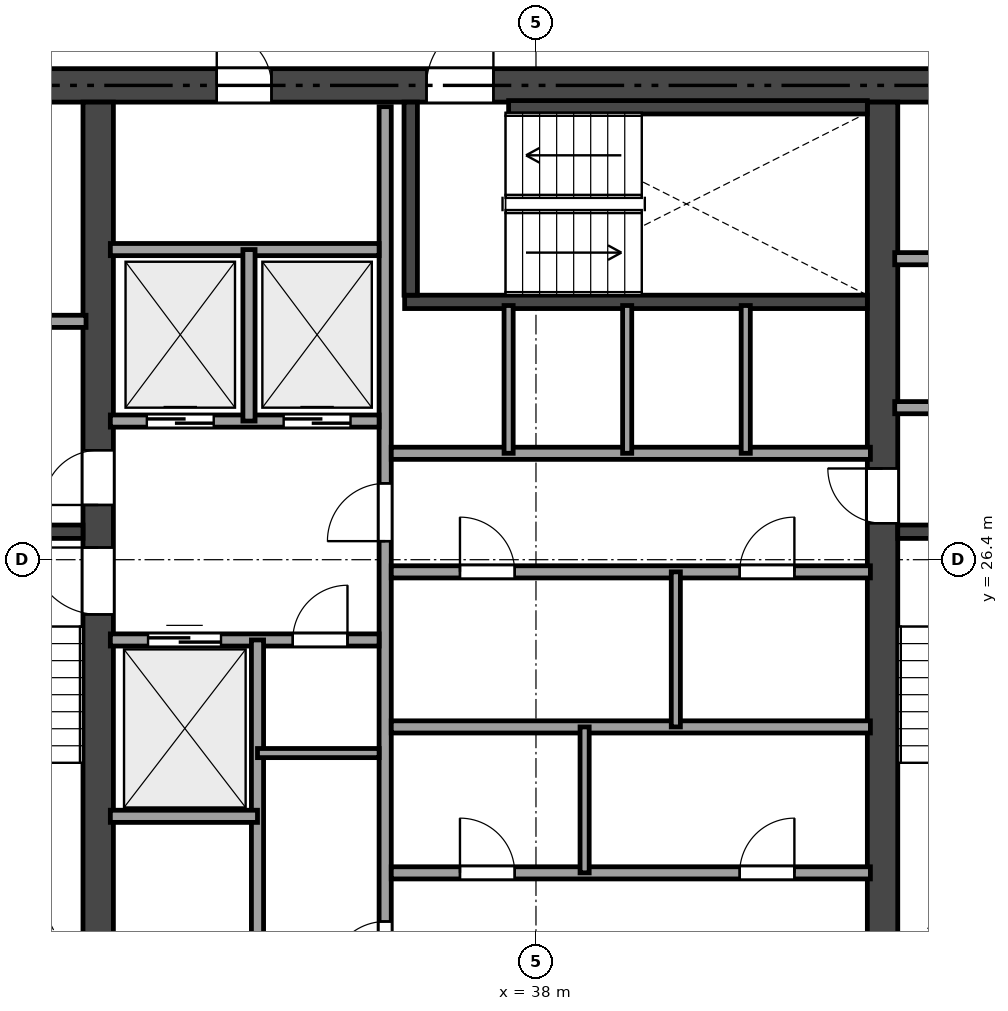
"""IFC4 building model, lengths in metres.
Left out: names, types, materials, properties, quantities, classifications, styles, units other than length and angle.
Written with IfcOpenShell. Run it as: python <this file> out.ifc"""

import sys

from ifc_helpers import new_model, si_unit, direction, frame, frame_2d, origin, place, context, subcontext, project, spatial, rectangle, extrude, element, fill, save


model = new_model("IFC4")
c1 = context("Model", 3, precision=1e-05, world=origin(), true_north=direction((0.0, 1.0)))
c2 = subcontext(c1, "Body", "Model", "MODEL_VIEW")
j1 = project(units=[si_unit("LENGTHUNIT", "METRE"), si_unit("PLANEANGLEUNIT", "RADIAN")], contexts=[c1])
p1 = place(None, origin())
s1 = spatial("IfcSite", under=j1, at=p1, CompositionType="ELEMENT")
p2 = place(p1, origin())
s2 = spatial("IfcBuilding", under=s1, at=p2, CompositionType="ELEMENT")
p3 = place(p2, frame((0.0, 0.0, 283.5)))
s3 = spatial("IfcBuildingStorey", under=s2, at=p3, CompositionType="ELEMENT", Elevation=283.5)
p4 = place(p3, frame((26.525, 34.2, 0.0), z_axis=(0.0, 0.0, 1.0), x_axis=(1.0, 0.0, 0.0)))
e1 = element("IfcWall", 1, at=p4, inside=s3, PredefinedType="SHEAR", context=c2, shape_type="SweptSolid", body=[
    extrude(rectangle(XDim=21.35, YDim=0.55, at=frame_2d((10.675, 0.0))), origin(), (0.0, 0.0, 1.0), 2.84),
])
p5 = place(p4, frame((9.675, 0.0, 0.0)))
e2 = element("IfcOpeningElement", 2, at=p5, cuts=e1, PredefinedType="OPENING", context=c2, shape_type="SweptSolid", body=[
    extrude(rectangle(XDim=1.1, YDim=2.15, at=frame_2d((0.55, 1.075))), frame((0.0, 0.285, 0.0), z_axis=(0.0, -1.0, 0.0), x_axis=(1.0, 0.0, 0.0)), (0.0, 0.0, 1.0), 0.57),
])
p6 = place(p4, frame((1.925, 0.0, 0.0)))
e3 = element("IfcOpeningElement", 3, at=p6, cuts=e1, PredefinedType="OPENING", context=c2, shape_type="SweptSolid", body=[
    extrude(rectangle(XDim=0.9, YDim=2.1, at=frame_2d((0.45, 1.05))), frame((0.0, 0.285, 0.0), z_axis=(0.0, -1.0, 0.0), x_axis=(1.0, 0.0, 0.0)), (0.0, 0.0, 1.0), 0.57),
])
p7 = place(p4, frame((6.225, 0.0, 0.0)))
e4 = element("IfcOpeningElement", 4, at=p7, cuts=e1, PredefinedType="OPENING", context=c2, shape_type="SweptSolid", body=[
    extrude(rectangle(XDim=0.9, YDim=2.1, at=frame_2d((0.45, 1.05))), frame((0.0, 0.285, 0.0), z_axis=(0.0, -1.0, 0.0), x_axis=(1.0, 0.0, 0.0)), (0.0, 0.0, 1.0), 0.57),
])
p8 = place(p3, frame((30.8, 18.875, 0.0), z_axis=(0.0, 0.0, 1.0), x_axis=(0.0, 1.0, 0.0)))
e5 = element("IfcWall", 5, at=p8, inside=s3, PredefinedType="SHEAR", context=c2, shape_type="SweptSolid", body=[
    extrude(rectangle(XDim=15.05, YDim=0.5, at=frame_2d((7.525, 0.0))), origin(), (0.0, 0.0, 1.0), 2.84),
])
p9 = place(p8, frame((6.625, 0.0, 0.0)))
e6 = element("IfcOpeningElement", 6, at=p9, cuts=e5, PredefinedType="OPENING", context=c2, shape_type="SweptSolid", body=[
    extrude(rectangle(XDim=1.1, YDim=2.15, at=frame_2d((0.55, 1.075))), frame((0.0, 0.26, 0.0), z_axis=(0.0, -1.0, 0.0), x_axis=(1.0, 0.0, 0.0)), (0.0, 0.0, 1.0), 0.52),
])
p10 = place(p8, frame((8.425, 0.0, 0.0)))
e7 = element("IfcOpeningElement", 7, at=p10, cuts=e5, PredefinedType="OPENING", context=c2, shape_type="SweptSolid", body=[
    extrude(rectangle(XDim=0.9, YDim=2.1, at=frame_2d((0.45, 1.05))), frame((0.0, 0.26, 0.0), z_axis=(0.0, -1.0, 0.0), x_axis=(1.0, 0.0, 0.0)), (0.0, 0.0, 1.0), 0.52),
])
p11 = place(p3, frame((43.7, 18.875, 0.0), z_axis=(0.0, 0.0, 1.0), x_axis=(0.0, 1.0, 0.0)))
e8 = element("IfcWall", 8, at=p11, inside=s3, PredefinedType="SHEAR", context=c2, shape_type="SweptSolid", body=[
    extrude(rectangle(XDim=15.05, YDim=0.5, at=frame_2d((7.525, 0.0))), origin(), (0.0, 0.0, 1.0), 2.84),
])
p12 = place(p11, frame((8.125, 0.0, 0.0)))
e9 = element("IfcOpeningElement", 9, at=p12, cuts=e8, PredefinedType="OPENING", context=c2, shape_type="SweptSolid", body=[
    extrude(rectangle(XDim=0.9, YDim=2.1, at=frame_2d((0.45, 1.05))), frame((0.0, 0.26, 0.0), z_axis=(0.0, -1.0, 0.0), x_axis=(1.0, 0.0, 0.0)), (0.0, 0.0, 1.0), 0.52),
])
p13 = place(p3, frame((27.075, 26.86, 0.0), z_axis=(0.0, 0.0, 1.0), x_axis=(1.0, 0.0, 0.0)))
e10 = element("IfcWall", 10, at=p13, inside=s3, PredefinedType="SHEAR", context=c2, shape_type="SweptSolid", body=[
    extrude(rectangle(XDim=3.475, YDim=0.22, at=frame_2d((1.738, 0.0))), origin(), (0.0, 0.0, 1.0), 2.84),
])
p14 = place(p3, frame((43.95, 26.86, 0.0), z_axis=(0.0, 0.0, 1.0), x_axis=(1.0, 0.0, 0.0)))
e11 = element("IfcWall", 11, at=p14, inside=s3, PredefinedType="SHEAR", context=c2, shape_type="SweptSolid", body=[
    extrude(rectangle(XDim=3.375, YDim=0.22, at=frame_2d((1.688, 0.0))), origin(), (0.0, 0.0, 1.0), 2.84),
])
p15 = place(p3, frame((35.84, 30.64, 0.0), z_axis=(0.0, 0.0, 1.0), x_axis=(1.0, 0.0, 0.0)))
e12 = element("IfcWall", 12, at=p15, inside=s3, PredefinedType="SHEAR", context=c2, shape_type="SweptSolid", body=[
    extrude(rectangle(XDim=7.61, YDim=0.22, at=frame_2d((3.805, 0.0))), origin(), (0.0, 0.0, 1.0), 2.84),
])
p16 = place(p3, frame((35.94, 30.75, 0.0), z_axis=(0.0, 0.0, 1.0), x_axis=(0.0, 1.0, 0.0)))
e13 = element("IfcWall", 13, at=p16, inside=s3, PredefinedType="SHEAR", context=c2, shape_type="SweptSolid", body=[
    extrude(rectangle(XDim=3.175, YDim=0.22, at=frame_2d((1.587, 0.0))), origin(), (0.0, 0.0, 1.0), 2.84),
])
p17 = place(p3, frame((37.55, 33.84, 0.0), z_axis=(0.0, 0.0, 1.0), x_axis=(1.0, 0.0, 0.0)))
e14 = element("IfcWall", 14, at=p17, inside=s3, PredefinedType="SHEAR", context=c2, shape_type="SweptSolid", body=[
    extrude(rectangle(XDim=5.9, YDim=0.22, at=frame_2d((2.95, 0.0))), origin(), (0.0, 0.0, 1.0), 2.84),
])
p18 = place(p3, frame((27.15, 30.32, 0.0), z_axis=(0.0, 0.0, 1.0), x_axis=(1.0, 0.0, 0.0)))
e15 = element("IfcWall", 15, at=p18, inside=s3, PredefinedType="SOLIDWALL", context=c2, shape_type="SweptSolid", body=[
    extrude(rectangle(XDim=3.45, YDim=0.2, at=frame_2d((1.725, 0.0))), origin(), (0.0, 0.0, 1.0), 2.84),
])
p19 = place(p3, frame((43.9, 28.9, 0.0), z_axis=(0.0, 0.0, 1.0), x_axis=(1.0, 0.0, 0.0)))
e16 = element("IfcWall", 16, at=p19, inside=s3, PredefinedType="SOLIDWALL", context=c2, shape_type="SweptSolid", body=[
    extrude(rectangle(XDim=3.35, YDim=0.2, at=frame_2d((1.675, 0.0))), origin(), (0.0, 0.0, 1.0), 2.84),
])
p20 = place(p19, frame((1.15, 0.0, 0.0)))
e17 = element("IfcOpeningElement", 17, at=p20, cuts=e16, PredefinedType="OPENING", context=c2, shape_type="SweptSolid", body=[
    extrude(rectangle(XDim=0.9, YDim=2.1, at=frame_2d((0.45, 1.05))), frame((0.0, 0.11, 0.0), z_axis=(0.0, -1.0, 0.0), x_axis=(1.0, 0.0, 0.0)), (0.0, 0.0, 1.0), 0.22),
])
p21 = place(p3, frame((43.9, 31.35, 0.0), z_axis=(0.0, 0.0, 1.0), x_axis=(1.0, 0.0, 0.0)))
e18 = element("IfcWall", 18, at=p21, inside=s3, PredefinedType="SOLIDWALL", context=c2, shape_type="SweptSolid", body=[
    extrude(rectangle(XDim=3.35, YDim=0.2, at=frame_2d((1.675, 0.0))), origin(), (0.0, 0.0, 1.0), 2.84),
])
p22 = place(p3, frame((35.52, 18.95, 0.0), z_axis=(0.0, 0.0, 1.0), x_axis=(0.0, 1.0, 0.0)))
e19 = element("IfcWall", 19, at=p22, inside=s3, PredefinedType="SOLIDWALL", context=c2, shape_type="SweptSolid", body=[
    extrude(rectangle(XDim=14.9, YDim=0.2, at=frame_2d((7.45, 0.0))), origin(), (0.0, 0.0, 1.0), 2.361),
])
p23 = place(p22, frame((7.755, 0.0, 0.0)))
e20 = element("IfcOpeningElement", 20, at=p23, cuts=e19, PredefinedType="OPENING", context=c2, shape_type="SweptSolid", body=[
    extrude(rectangle(XDim=0.95, YDim=2.15, at=frame_2d((0.475, 1.075))), frame((0.0, 0.11, 0.0), z_axis=(0.0, -1.0, 0.0), x_axis=(1.0, 0.0, 0.0)), (0.0, 0.0, 1.0), 0.22),
])
p24 = place(p22, frame((0.6, 0.0, 0.0)))
e21 = element("IfcOpeningElement", 21, at=p24, cuts=e19, PredefinedType="OPENING", context=c2, shape_type="SweptSolid", body=[
    extrude(rectangle(XDim=0.9, YDim=2.1, at=frame_2d((0.45, 1.05))), frame((0.0, 0.11, 0.0), z_axis=(0.0, -1.0, 0.0), x_axis=(1.0, 0.0, 0.0)), (0.0, 0.0, 1.0), 0.22),
])
p25 = place(p3, frame((31.0, 28.68, 0.0), z_axis=(0.0, 0.0, 1.0), x_axis=(1.0, 0.0, 0.0)))
e22 = element("IfcWall", 22, at=p25, inside=s3, PredefinedType="SOLIDWALL", context=c2, shape_type="SweptSolid", body=[
    extrude(rectangle(XDim=4.42, YDim=0.2, at=frame_2d((2.21, 0.0))), origin(), (0.0, 0.0, 1.0), 2.84),
])
p26 = place(p25, frame((0.6, 0.0, 0.0)))
e23 = element("IfcOpeningElement", 23, at=p26, cuts=e22, PredefinedType="OPENING", context=c2, shape_type="SweptSolid", body=[
    extrude(rectangle(XDim=1.1, YDim=2.15, at=frame_2d((0.55, 1.075))), frame((0.0, 0.11, 0.0), z_axis=(0.0, -1.0, 0.0), x_axis=(1.0, 0.0, 0.0)), (0.0, 0.0, 1.0), 0.22),
])
p27 = place(p25, frame((2.85, 0.0, 0.0)))
e24 = element("IfcOpeningElement", 24, at=p27, cuts=e22, PredefinedType="OPENING", context=c2, shape_type="SweptSolid", body=[
    extrude(rectangle(XDim=1.1, YDim=2.15, at=frame_2d((0.55, 1.075))), frame((0.0, 0.11, 0.0), z_axis=(0.0, -1.0, 0.0), x_axis=(1.0, 0.0, 0.0)), (0.0, 0.0, 1.0), 0.22),
])
p28 = place(p3, frame((31.0, 31.5, 0.0), z_axis=(0.0, 0.0, 1.0), x_axis=(1.0, 0.0, 0.0)))
e25 = element("IfcWall", 25, at=p28, inside=s3, PredefinedType="SOLIDWALL", context=c2, shape_type="SweptSolid", body=[
    extrude(rectangle(XDim=4.42, YDim=0.2, at=frame_2d((2.21, 0.0))), origin(), (0.0, 0.0, 1.0), 2.84),
])
p29 = place(p3, frame((33.28, 28.68, 0.0), z_axis=(0.0, 0.0, 1.0), x_axis=(0.0, 1.0, 0.0)))
e26 = element("IfcWall", 26, at=p29, inside=s3, PredefinedType="SOLIDWALL", context=c2, shape_type="SweptSolid", body=[
    extrude(rectangle(XDim=2.82, YDim=0.2, at=frame_2d((1.41, 0.0))), origin(), (0.0, 0.0, 1.0), 2.84),
])
p30 = place(p3, frame((31.0, 25.08, 0.0), z_axis=(0.0, 0.0, 1.0), x_axis=(1.0, 0.0, 0.0)))
e27 = element("IfcWall", 27, at=p30, inside=s3, PredefinedType="SOLIDWALL", context=c2, shape_type="SweptSolid", body=[
    extrude(rectangle(XDim=4.42, YDim=0.2, at=frame_2d((2.21, 0.0))), origin(), (0.0, 0.0, 1.0), 2.84),
])
p31 = place(p30, frame((3.0, 0.0, 0.0)))
e28 = element("IfcOpeningElement", 28, at=p31, cuts=e27, PredefinedType="OPENING", context=c2, shape_type="SweptSolid", body=[
    extrude(rectangle(XDim=0.9, YDim=2.1, at=frame_2d((0.45, 1.05))), frame((0.0, 0.11, 0.0), z_axis=(0.0, -1.0, 0.0), x_axis=(1.0, 0.0, 0.0)), (0.0, 0.0, 1.0), 0.22),
])
p32 = place(p30, frame((0.62, 0.0, 0.0)))
e29 = element("IfcOpeningElement", 29, at=p32, cuts=e27, PredefinedType="OPENING", context=c2, shape_type="SweptSolid", body=[
    extrude(rectangle(XDim=1.2, YDim=2.15, at=frame_2d((0.6, 1.075))), frame((0.0, 0.11, 0.0), z_axis=(0.0, -1.0, 0.0), x_axis=(1.0, 0.0, 0.0)), (0.0, 0.0, 1.0), 0.22),
])
p33 = place(p3, frame((33.42, 18.95, 0.0), z_axis=(0.0, 0.0, 1.0), x_axis=(0.0, 1.0, 0.0)))
e30 = element("IfcWall", 30, at=p33, inside=s3, PredefinedType="SOLIDWALL", context=c2, shape_type="SweptSolid", body=[
    extrude(rectangle(XDim=6.13, YDim=0.2, at=frame_2d((3.065, 0.0))), origin(), (0.0, 0.0, 1.0), 2.361),
])
p34 = place(p3, frame((31.0, 22.18, 0.0), z_axis=(0.0, 0.0, 1.0), x_axis=(1.0, 0.0, 0.0)))
e31 = element("IfcWall", 31, at=p34, inside=s3, PredefinedType="SOLIDWALL", context=c2, shape_type="SweptSolid", body=[
    extrude(rectangle(XDim=2.42, YDim=0.2, at=frame_2d((1.21, 0.0))), origin(), (0.0, 0.0, 1.0), 2.84),
])
p35 = place(p3, frame((33.42, 23.22, 0.0), z_axis=(0.0, 0.0, 1.0), x_axis=(1.0, 0.0, 0.0)))
e32 = element("IfcWall", 32, at=p35, inside=s3, PredefinedType="PARTITIONING", context=c2, shape_type="SweptSolid", body=[
    extrude(rectangle(XDim=2.0, YDim=0.15, at=frame_2d((1.0, 0.0))), origin(), (0.0, 0.0, 1.0), 2.84),
])
p36 = place(p3, frame((35.62, 28.15, 0.0), z_axis=(0.0, 0.0, 1.0), x_axis=(1.0, 0.0, 0.0)))
e33 = element("IfcWall", 33, at=p36, inside=s3, PredefinedType="SOLIDWALL", context=c2, shape_type="SweptSolid", body=[
    extrude(rectangle(XDim=7.88, YDim=0.2, at=frame_2d((3.94, 0.0))), origin(), (0.0, 0.0, 1.0), 2.84),
])
p37 = place(p3, frame((35.62, 26.2, 0.0), z_axis=(0.0, 0.0, 1.0), x_axis=(1.0, 0.0, 0.0)))
e34 = element("IfcWall", 34, at=p37, inside=s3, PredefinedType="SOLIDWALL", context=c2, shape_type="SweptSolid", body=[
    extrude(rectangle(XDim=7.88, YDim=0.2, at=frame_2d((3.94, 0.0))), origin(), (0.0, 0.0, 1.0), 2.84),
])
p38 = place(p37, frame((1.13, 0.0, 0.0)))
e35 = element("IfcOpeningElement", 35, at=p38, cuts=e34, PredefinedType="OPENING", context=c2, shape_type="SweptSolid", body=[
    extrude(rectangle(XDim=0.9, YDim=2.1, at=frame_2d((0.45, 1.05))), frame((0.0, 0.11, 0.0), z_axis=(0.0, -1.0, 0.0), x_axis=(1.0, 0.0, 0.0)), (0.0, 0.0, 1.0), 0.22),
])
p39 = place(p37, frame((5.73, 0.0, 0.0)))
e36 = element("IfcOpeningElement", 36, at=p39, cuts=e34, PredefinedType="OPENING", context=c2, shape_type="SweptSolid", body=[
    extrude(rectangle(XDim=0.9, YDim=2.1, at=frame_2d((0.45, 1.05))), frame((0.0, 0.11, 0.0), z_axis=(0.0, -1.0, 0.0), x_axis=(1.0, 0.0, 0.0)), (0.0, 0.0, 1.0), 0.22),
])
p40 = place(p3, frame((35.62, 23.65, 0.0), z_axis=(0.0, 0.0, 1.0), x_axis=(1.0, 0.0, 0.0)))
e37 = element("IfcWall", 37, at=p40, inside=s3, PredefinedType="SOLIDWALL", context=c2, shape_type="SweptSolid", body=[
    extrude(rectangle(XDim=7.88, YDim=0.2, at=frame_2d((3.94, 0.0))), origin(), (0.0, 0.0, 1.0), 2.361),
])
p41 = place(p3, frame((35.62, 21.25, 0.0), z_axis=(0.0, 0.0, 1.0), x_axis=(1.0, 0.0, 0.0)))
e38 = element("IfcWall", 38, at=p41, inside=s3, PredefinedType="SOLIDWALL", context=c2, shape_type="SweptSolid", body=[
    extrude(rectangle(XDim=7.88, YDim=0.2, at=frame_2d((3.94, 0.0))), origin(), (0.0, 0.0, 1.0), 2.84),
])
p42 = place(p41, frame((1.13, 0.0, 0.0)))
e39 = element("IfcOpeningElement", 39, at=p42, cuts=e38, PredefinedType="OPENING", context=c2, shape_type="SweptSolid", body=[
    extrude(rectangle(XDim=0.9, YDim=2.1, at=frame_2d((0.45, 1.05))), frame((0.0, 0.11, 0.0), z_axis=(0.0, -1.0, 0.0), x_axis=(1.0, 0.0, 0.0)), (0.0, 0.0, 1.0), 0.22),
])
p43 = place(p41, frame((5.73, 0.0, 0.0)))
e40 = element("IfcOpeningElement", 40, at=p43, cuts=e38, PredefinedType="OPENING", context=c2, shape_type="SweptSolid", body=[
    extrude(rectangle(XDim=0.9, YDim=2.1, at=frame_2d((0.45, 1.05))), frame((0.0, 0.11, 0.0), z_axis=(0.0, -1.0, 0.0), x_axis=(1.0, 0.0, 0.0)), (0.0, 0.0, 1.0), 0.22),
])
for number, where, z_axis, x_axis in (
    (41, (37.55, 28.15, 0.0), (0.0, 0.0, 1.0), (0.0, 1.0, 0.0)),
    (42, (39.5, 28.15, 0.0), (0.0, 0.0, 1.0), (0.0, 1.0, 0.0)),
    (43, (41.45, 28.15, 0.0), (0.0, 0.0, 1.0), (0.0, 1.0, 0.0)),
):
    element("IfcWall", number, at=place(p3, frame(where, z_axis=z_axis, x_axis=x_axis)), inside=s3, PredefinedType="PARTITIONING", context=c2, shape_type="SweptSolid", body=[
        extrude(rectangle(XDim=2.43, YDim=0.15, at=frame_2d((1.215, 0.0))), origin(), (0.0, 0.0, 1.0), 2.84),
    ])
p44 = place(p3, frame((40.3, 23.65, 0.0), z_axis=(0.0, 0.0, 1.0), x_axis=(0.0, 1.0, 0.0)))
e44 = element("IfcWall", 44, at=p44, inside=s3, PredefinedType="PARTITIONING", context=c2, shape_type="SweptSolid", body=[
    extrude(rectangle(XDim=2.55, YDim=0.15, at=frame_2d((1.275, 0.0))), origin(), (0.0, 0.0, 1.0), 2.361),
])
p45 = place(p3, frame((38.8, 21.25, 0.0), z_axis=(0.0, 0.0, 1.0), x_axis=(0.0, 1.0, 0.0)))
e45 = element("IfcWall", 45, at=p45, inside=s3, PredefinedType="PARTITIONING", context=c2, shape_type="SweptSolid", body=[
    extrude(rectangle(XDim=2.4, YDim=0.15, at=frame_2d((1.2, 0.0))), origin(), (0.0, 0.0, 1.0), 2.361),
])
p46 = place(p9, origin())
e46 = element("IfcDoor", 46, at=p46, inside=s3, OperationType="SINGLE_SWING_RIGHT", PredefinedType="DOOR", context=c2, shape_type="SweptSolid", body=[
    extrude(rectangle(XDim=1.1, YDim=2.15, at=frame_2d((0.55, 1.075))), frame((0.0, 0.025, 0.0), z_axis=(0.0, -1.0, 0.0), x_axis=(1.0, 0.0, 0.0)), (0.0, 0.0, 1.0), 0.05),
])
fill(e6, e46)
p47 = place(p5, origin())
e47 = element("IfcDoor", 47, at=p47, inside=s3, OperationType="SINGLE_SWING_RIGHT", PredefinedType="DOOR", context=c2, shape_type="SweptSolid", body=[
    extrude(rectangle(XDim=1.1, YDim=2.15, at=frame_2d((0.55, 1.075))), frame((0.0, 0.025, 0.0), z_axis=(0.0, -1.0, 0.0), x_axis=(1.0, 0.0, 0.0)), (0.0, 0.0, 1.0), 0.05),
])
fill(e2, e47)
p48 = place(p23, origin())
e48 = element("IfcDoor", 48, at=p48, inside=s3, OperationType="SINGLE_SWING_LEFT", PredefinedType="DOOR", context=c2, shape_type="SweptSolid", body=[
    extrude(rectangle(XDim=0.95, YDim=2.15, at=frame_2d((0.475, 1.075))), frame((0.0, 0.025, 0.0), z_axis=(0.0, -1.0, 0.0), x_axis=(1.0, 0.0, 0.0)), (0.0, 0.0, 1.0), 0.05),
])
fill(e20, e48)
p49 = place(p12, origin())
e49 = element("IfcDoor", 49, at=p49, inside=s3, OperationType="SINGLE_SWING_RIGHT", PredefinedType="DOOR", context=c2, shape_type="SweptSolid", body=[
    extrude(rectangle(XDim=0.9, YDim=2.1, at=frame_2d((0.45, 1.05))), frame((0.0, 0.025, 0.0), z_axis=(0.0, -1.0, 0.0), x_axis=(1.0, 0.0, 0.0)), (0.0, 0.0, 1.0), 0.05),
])
fill(e9, e49)
p50 = place(p10, origin())
e50 = element("IfcDoor", 50, at=p50, inside=s3, OperationType="SINGLE_SWING_LEFT", PredefinedType="DOOR", context=c2, shape_type="SweptSolid", body=[
    extrude(rectangle(XDim=0.9, YDim=2.1, at=frame_2d((0.45, 1.05))), frame((0.0, 0.025, 0.0), z_axis=(0.0, -1.0, 0.0), x_axis=(1.0, 0.0, 0.0)), (0.0, 0.0, 1.0), 0.05),
])
fill(e7, e50)
p51 = place(p7, origin())
e51 = element("IfcDoor", 51, at=p51, inside=s3, OperationType="SINGLE_SWING_LEFT", PredefinedType="DOOR", context=c2, shape_type="SweptSolid", body=[
    extrude(rectangle(XDim=0.9, YDim=2.1, at=frame_2d((0.45, 1.05))), frame((0.0, 0.025, 0.0), z_axis=(0.0, -1.0, 0.0), x_axis=(1.0, 0.0, 0.0)), (0.0, 0.0, 1.0), 0.05),
])
fill(e4, e51)
p52 = place(p24, origin())
e52 = element("IfcDoor", 52, at=p52, inside=s3, OperationType="SINGLE_SWING_LEFT", PredefinedType="DOOR", context=c2, shape_type="SweptSolid", body=[
    extrude(rectangle(XDim=0.9, YDim=2.1, at=frame_2d((0.45, 1.05))), frame((0.0, 0.025, 0.0), z_axis=(0.0, -1.0, 0.0), x_axis=(1.0, 0.0, 0.0)), (0.0, 0.0, 1.0), 0.05),
])
fill(e21, e52)
p53 = place(p31, origin())
e53 = element("IfcDoor", 53, at=p53, inside=s3, OperationType="SINGLE_SWING_RIGHT", PredefinedType="DOOR", context=c2, shape_type="SweptSolid", body=[
    extrude(rectangle(XDim=0.9, YDim=2.1, at=frame_2d((0.45, 1.05))), frame((0.0, 0.025, 0.0), z_axis=(0.0, -1.0, 0.0), x_axis=(1.0, 0.0, 0.0)), (0.0, 0.0, 1.0), 0.05),
])
fill(e28, e53)
p54 = place(p42, origin())
e54 = element("IfcDoor", 54, at=p54, inside=s3, OperationType="SINGLE_SWING_LEFT", PredefinedType="DOOR", context=c2, shape_type="SweptSolid", body=[
    extrude(rectangle(XDim=0.9, YDim=2.1, at=frame_2d((0.45, 1.05))), frame((0.0, 0.025, 0.0), z_axis=(0.0, -1.0, 0.0), x_axis=(1.0, 0.0, 0.0)), (0.0, 0.0, 1.0), 0.05),
])
fill(e39, e54)
p55 = place(p43, origin())
e55 = element("IfcDoor", 55, at=p55, inside=s3, OperationType="SINGLE_SWING_RIGHT", PredefinedType="DOOR", context=c2, shape_type="SweptSolid", body=[
    extrude(rectangle(XDim=0.9, YDim=2.1, at=frame_2d((0.45, 1.05))), frame((0.0, 0.025, 0.0), z_axis=(0.0, -1.0, 0.0), x_axis=(1.0, 0.0, 0.0)), (0.0, 0.0, 1.0), 0.05),
])
fill(e40, e55)
p56 = place(p38, origin())
e56 = element("IfcDoor", 56, at=p56, inside=s3, OperationType="SINGLE_SWING_LEFT", PredefinedType="DOOR", context=c2, shape_type="SweptSolid", body=[
    extrude(rectangle(XDim=0.9, YDim=2.1, at=frame_2d((0.45, 1.05))), frame((0.0, 0.025, 0.0), z_axis=(0.0, -1.0, 0.0), x_axis=(1.0, 0.0, 0.0)), (0.0, 0.0, 1.0), 0.05),
])
fill(e35, e56)
p57 = place(p39, origin())
e57 = element("IfcDoor", 57, at=p57, inside=s3, OperationType="SINGLE_SWING_RIGHT", PredefinedType="DOOR", context=c2, shape_type="SweptSolid", body=[
    extrude(rectangle(XDim=0.9, YDim=2.1, at=frame_2d((0.45, 1.05))), frame((0.0, 0.025, 0.0), z_axis=(0.0, -1.0, 0.0), x_axis=(1.0, 0.0, 0.0)), (0.0, 0.0, 1.0), 0.05),
])
fill(e36, e57)
p58 = place(p26, origin())
e58 = element("IfcDoor", 58, at=p58, inside=s3, OperationType="SLIDING_TO_LEFT", PredefinedType="DOOR", context=c2, shape_type="SweptSolid", body=[
    extrude(rectangle(XDim=1.1, YDim=2.15, at=frame_2d((0.55, 1.075))), frame((0.0, 0.025, 0.0), z_axis=(0.0, -1.0, 0.0), x_axis=(1.0, 0.0, 0.0)), (0.0, 0.0, 1.0), 0.05),
])
fill(e23, e58)
p59 = place(p27, origin())
e59 = element("IfcDoor", 59, at=p59, inside=s3, OperationType="SLIDING_TO_LEFT", PredefinedType="DOOR", context=c2, shape_type="SweptSolid", body=[
    extrude(rectangle(XDim=1.1, YDim=2.15, at=frame_2d((0.55, 1.075))), frame((0.0, 0.025, 0.0), z_axis=(0.0, -1.0, 0.0), x_axis=(1.0, 0.0, 0.0)), (0.0, 0.0, 1.0), 0.05),
])
fill(e24, e59)
p60 = place(p32, origin())
e60 = element("IfcDoor", 60, at=p60, inside=s3, OperationType="SLIDING_TO_LEFT", PredefinedType="DOOR", context=c2, shape_type="SweptSolid", body=[
    extrude(rectangle(XDim=1.2, YDim=2.15, at=frame_2d((0.6, 1.075))), frame((0.0, 0.025, 0.0), z_axis=(0.0, -1.0, 0.0), x_axis=(1.0, 0.0, 0.0)), (0.0, 0.0, 1.0), 0.05),
])
fill(e29, e60)
save(model, sys.argv[1])
